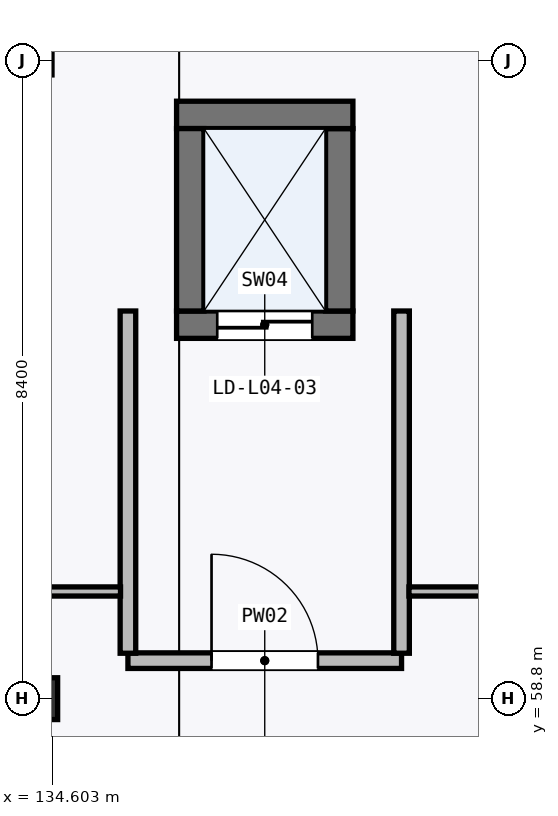
"""IFC4 building model, lengths in metres.
Left out: names, types, materials, properties, quantities, classifications, styles, units other than length and angle.
Written with IfcOpenShell. Run it as: python <this file> out.ifc"""

import sys

from ifc_helpers import new_model, si_unit, direction, frame, frame_2d, origin, origin_2d, place, context, subcontext, project, spatial, rectangle, hollow_rectangle, i_section, extrude, element, fill, save


model = new_model("IFC4")
c1 = context("Model", 3, precision=1e-05, world=origin(), true_north=direction((0.0, 1.0)))
c2 = subcontext(c1, "Body", "Model", "MODEL_VIEW")
j1 = project(units=[si_unit("LENGTHUNIT", "METRE"), si_unit("PLANEANGLEUNIT", "RADIAN")], contexts=[c1])
p1 = place(None, origin())
s1 = spatial("IfcSite", under=j1, at=p1, CompositionType="ELEMENT")
p2 = place(p1, origin())
s2 = spatial("IfcBuilding", under=s1, at=p2, CompositionType="ELEMENT")
p3 = place(p2, frame((0.0, 0.0, 16.5)))
s3 = spatial("IfcBuildingStorey", under=s2, at=p3, CompositionType="ELEMENT", Elevation=16.5)
p4 = place(p3, frame((134.4, 58.8, 0.0), z_axis=(0.0, 0.0, 1.0), x_axis=(1.0, 0.0, 0.0)))
e1 = element("IfcColumn", 1, at=p4, inside=s3, PredefinedType="COLUMN", context=c2, shape_type="SweptSolid", body=[
    extrude(hollow_rectangle(XDim=0.55, YDim=0.55, WallThickness=0.022, at=origin_2d()), origin(), (0.0, 0.0, 1.0), 5.1),
])
p5 = place(p3, frame((134.4, 67.2, 0.0), z_axis=(0.0, 0.0, 1.0), x_axis=(1.0, 0.0, 0.0)))
e2 = element("IfcColumn", 2, at=p5, inside=s3, PredefinedType="COLUMN", context=c2, shape_type="SweptSolid", body=[
    extrude(i_section(OverallWidth=0.402, OverallDepth=0.388, WebThickness=0.015, FlangeThickness=0.015, FilletRadius=0.022, at=origin_2d()), origin(), (0.0, 0.0, 1.0), 5.1),
])
p6 = place(p3, frame((136.24, 63.72, 0.0), z_axis=(0.0, 0.0, 1.0), x_axis=(1.0, 0.0, 0.0)))
e3 = element("IfcWall", 3, at=p6, inside=s3, PredefinedType="SHEAR", context=c2, shape_type="SweptSolid", body=[
    extrude(rectangle(XDim=2.32, YDim=0.36, at=frame_2d((1.16, 0.0))), origin(), (0.0, 0.0, 1.0), 4.845),
])
p7 = place(p6, frame((0.535, 0.0, 0.0)))
e4 = element("IfcOpeningElement", 4, at=p7, cuts=e3, PredefinedType="OPENING", context=c2, shape_type="SweptSolid", body=[
    extrude(rectangle(XDim=1.25, YDim=2.2, at=frame_2d((0.625, 1.1))), frame((0.0, 0.19, 0.0), z_axis=(0.0, -1.0, 0.0), x_axis=(1.0, 0.0, 0.0)), (0.0, 0.0, 1.0), 0.38),
])
p8 = place(p3, frame((138.38, 63.9, 0.0), z_axis=(0.0, 0.0, 1.0), x_axis=(0.0, 1.0, 0.0)))
e5 = element("IfcWall", 5, at=p8, inside=s3, PredefinedType="SHEAR", context=c2, shape_type="SweptSolid", body=[
    extrude(rectangle(XDim=2.4, YDim=0.36, at=frame_2d((1.2, 0.0))), origin(), (0.0, 0.0, 1.0), 4.845),
])
p9 = place(p3, frame((138.56, 66.48, 0.0), z_axis=(0.0, 0.0, 1.0), x_axis=(-1.0, 0.0, 0.0)))
e6 = element("IfcWall", 6, at=p9, inside=s3, PredefinedType="SHEAR", context=c2, shape_type="SweptSolid", body=[
    extrude(rectangle(XDim=2.32, YDim=0.36, at=frame_2d((1.16, 0.0))), origin(), (0.0, 0.0, 1.0), 4.845),
])
p10 = place(p3, frame((136.42, 66.3, 0.0), z_axis=(0.0, 0.0, 1.0), x_axis=(0.0, -1.0, 0.0)))
e7 = element("IfcWall", 7, at=p10, inside=s3, PredefinedType="SHEAR", context=c2, shape_type="SweptSolid", body=[
    extrude(rectangle(XDim=2.4, YDim=0.36, at=frame_2d((1.2, 0.0))), origin(), (0.0, 0.0, 1.0), 4.845),
])
p11 = place(p3, frame((135.6, 59.3, 0.0), z_axis=(0.0, 0.0, 1.0), x_axis=(1.0, 0.0, 0.0)))
e8 = element("IfcWall", 8, at=p11, inside=s3, PredefinedType="PARTITIONING", context=c2, shape_type="SweptSolid", body=[
    extrude(rectangle(XDim=3.6, YDim=0.205, at=frame_2d((1.8, 0.0))), origin(), (0.0, 0.0, 1.0), 4.845),
])
p12 = place(p11, frame((1.1, 0.0, 0.0)))
e9 = element("IfcOpeningElement", 9, at=p12, cuts=e8, PredefinedType="OPENING", context=c2, shape_type="SweptSolid", body=[
    extrude(rectangle(XDim=1.4, YDim=2.15, at=frame_2d((0.7, 1.075))), frame((0.0, 0.113, 0.0), z_axis=(0.0, -1.0, 0.0), x_axis=(1.0, 0.0, 0.0)), (0.0, 0.0, 1.0), 0.225),
])
for number, where, z_axis, x_axis in (
    (10, (139.2, 59.397, 0.0), (0.0, 0.0, 1.0), (0.0, 1.0, 0.0)),
    (11, (135.6, 63.9, 0.0), (0.0, 0.0, 1.0), (0.0, -1.0, 0.0)),
):
    element("IfcWall", number, at=place(p3, frame(where, z_axis=z_axis, x_axis=x_axis)), inside=s3, PredefinedType="PARTITIONING", context=c2, shape_type="SweptSolid", body=[
        extrude(rectangle(XDim=4.502, YDim=0.205, at=frame_2d((2.251, 0.0))), origin(), (0.0, 0.0, 1.0), 4.845),
    ])
p13 = place(p3, frame((139.298, 60.21, 0.0), z_axis=(0.0, 0.0, 1.0), x_axis=(1.0, 0.0, 0.0)))
e12 = element("IfcWall", 12, at=p13, inside=s3, PredefinedType="PARTITIONING", context=c2, shape_type="SweptSolid", body=[
    extrude(rectangle(XDim=3.702, YDim=0.12, at=frame_2d((1.851, 0.0))), origin(), (0.0, 0.0, 1.0), 4.845),
])
p14 = place(p13, frame((1.326, 0.0, 0.0)))
e13 = element("IfcOpeningElement", 13, at=p14, cuts=e12, PredefinedType="OPENING", context=c2, shape_type="SweptSolid", body=[
    extrude(rectangle(XDim=1.05, YDim=2.1, at=frame_2d((0.525, 1.05))), frame((0.0, 0.07, 0.0), z_axis=(0.0, -1.0, 0.0), x_axis=(1.0, 0.0, 0.0)), (0.0, 0.0, 1.0), 0.14),
])
p15 = place(p3, frame((127.3, 60.21, 0.0), z_axis=(0.0, 0.0, 1.0), x_axis=(1.0, 0.0, 0.0)))
e14 = element("IfcWall", 14, at=p15, inside=s3, PredefinedType="PARTITIONING", context=c2, shape_type="SweptSolid", body=[
    extrude(rectangle(XDim=8.202, YDim=0.12, at=frame_2d((4.101, 0.0))), origin(), (0.0, 0.0, 1.0), 4.845),
])
p16 = place(p7, frame((1.25, 0.0, 0.0), z_axis=(0.0, 0.0, 1.0), x_axis=(-1.0, 0.0, 0.0)))
e15 = element("IfcDoor", 15, at=p16, inside=s3, OperationType="DOUBLE_DOOR_SLIDING", PredefinedType="DOOR", context=c2, shape_type="SweptSolid", body=[
    extrude(rectangle(XDim=1.25, YDim=2.2, at=frame_2d((0.625, 1.1))), frame((0.0, 0.025, 0.0), z_axis=(0.0, -1.0, 0.0), x_axis=(1.0, 0.0, 0.0)), (0.0, 0.0, 1.0), 0.05),
])
fill(e4, e15)
p17 = place(p12, origin())
e16 = element("IfcDoor", 16, at=p17, inside=s3, OperationType="SINGLE_SWING_LEFT", PredefinedType="DOOR", context=c2, shape_type="SweptSolid", body=[
    extrude(rectangle(XDim=1.4, YDim=2.15, at=frame_2d((0.7, 1.075))), frame((0.0, 0.025, 0.0), z_axis=(0.0, -1.0, 0.0), x_axis=(1.0, 0.0, 0.0)), (0.0, 0.0, 1.0), 0.05),
])
fill(e9, e16)
save(model, sys.argv[1])
